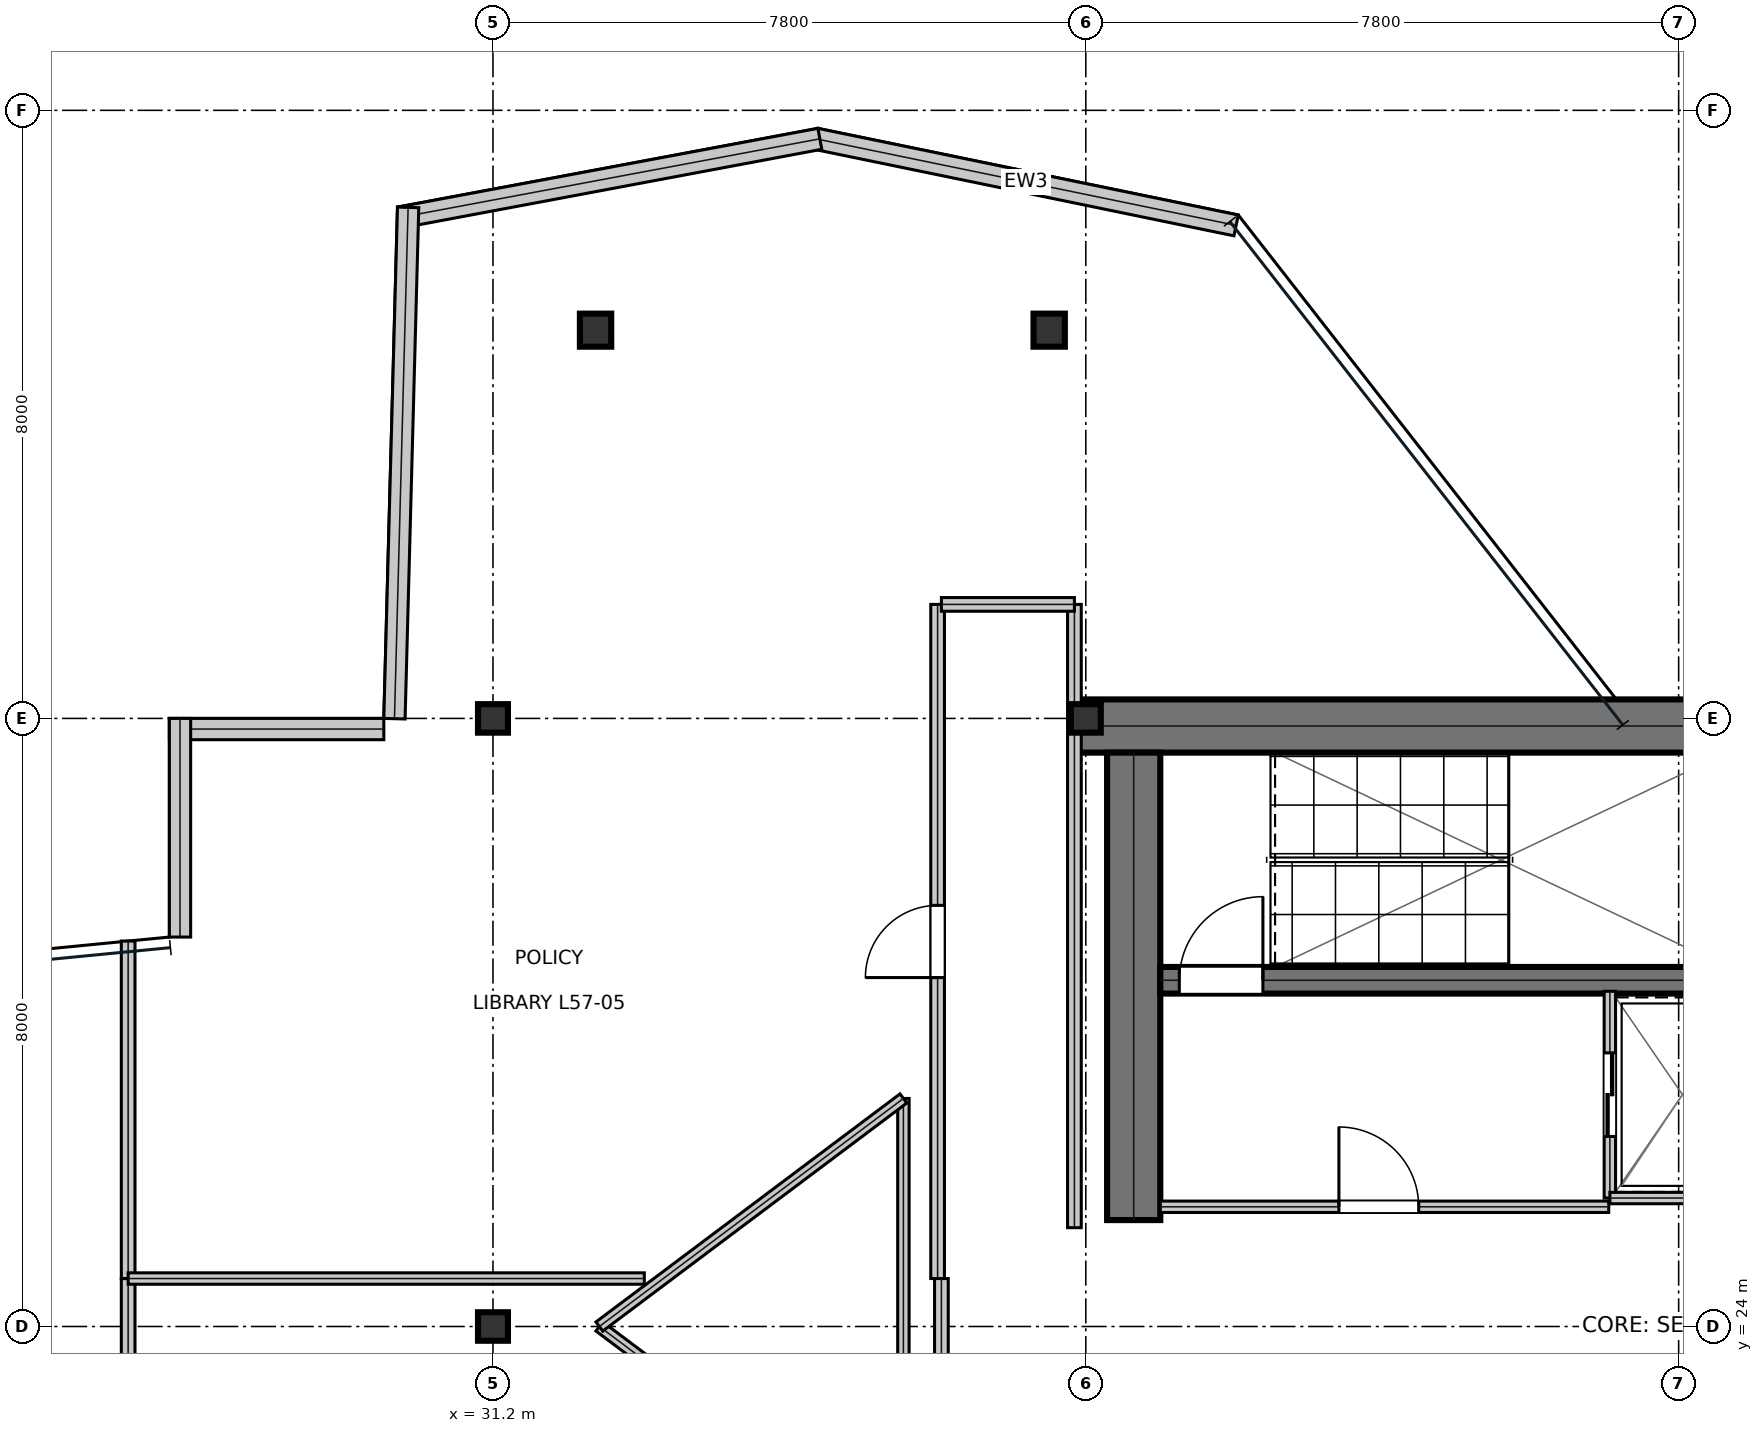
"""IFC4 building model, lengths in metres.
Left out: names, types, materials, properties, quantities, classifications, styles, units other than length and angle.
Written with IfcOpenShell. Run it as: python <this file> out.ifc"""

import sys

from ifc_helpers import new_model, si_unit, direction, frame, frame_2d, origin, origin_2d, place, context, subcontext, project, spatial, rectangle, i_section, extrude, element, fill, save


model = new_model("IFC4")
c1 = context("Model", 3, precision=1e-05, world=origin(), true_north=direction((0.0, 1.0)))
c2 = subcontext(c1, "Body", "Model", "MODEL_VIEW")
j1 = project(units=[si_unit("LENGTHUNIT", "METRE"), si_unit("PLANEANGLEUNIT", "RADIAN")], contexts=[c1])
p1 = place(None, origin())
s1 = spatial("IfcSite", under=j1, at=p1, CompositionType="ELEMENT")
p2 = place(p1, origin())
s2 = spatial("IfcBuilding", under=s1, at=p2, CompositionType="ELEMENT")
p3 = place(p2, frame((0.0, 0.0, 244.5)))
s3 = spatial("IfcBuildingStorey", under=s2, at=p3, CompositionType="ELEMENT", Elevation=244.5)
p4 = place(p3, frame((38.8, 31.9, 0.0), z_axis=(0.0, 0.0, 1.0), x_axis=(1.0, 0.0, 0.0)))
e1 = element("IfcWall", 1, at=p4, inside=s3, PredefinedType="SHEAR", context=c2, shape_type="SweptSolid", body=[
    extrude(rectangle(XDim=16.0, YDim=0.7, at=frame_2d((8.0, 0.0))), origin(), (0.0, 0.0, 1.0), 3.79),
])
p5 = place(p3, frame((39.63, 25.4, 0.0), z_axis=(0.0, 0.0, 1.0), x_axis=(0.0, 1.0, 0.0)))
e2 = element("IfcWall", 2, at=p5, inside=s3, PredefinedType="SHEAR", context=c2, shape_type="SweptSolid", body=[
    extrude(rectangle(XDim=6.15, YDim=0.7, at=frame_2d((3.075, 0.0))), origin(), (0.0, 0.0, 1.0), 3.79),
])
p6 = place(p3, frame((39.98, 28.555, 0.0), z_axis=(0.0, 0.0, 1.0), x_axis=(1.0, 0.0, 0.0)))
e3 = element("IfcWall", 3, at=p6, inside=s3, PredefinedType="SHEAR", context=c2, shape_type="SweptSolid", body=[
    extrude(rectangle(XDim=7.71, YDim=0.35, at=frame_2d((3.855, 0.0))), origin(), (0.0, 0.0, 1.0), 3.79),
])
p7 = place(p6, frame((0.25, 0.0, 0.0)))
e4 = element("IfcOpeningElement", 4, at=p7, cuts=e3, PredefinedType="OPENING", context=c2, shape_type="SweptSolid", body=[
    extrude(rectangle(XDim=1.1, YDim=2.15, at=frame_2d((0.55, 1.075))), frame((0.0, 0.185, 0.0), z_axis=(0.0, -1.0, 0.0), x_axis=(1.0, 0.0, 0.0)), (0.0, 0.0, 1.0), 0.37),
])
for number, where, z_axis, x_axis in (
    (5, (31.2, 24.0, 0.0), (0.0, 0.0, 1.0), (1.0, 0.0, 0.0)),
    (6, (31.2, 32.0, 0.0), (0.0, 0.0, 1.0), (1.0, 0.0, 0.0)),
    (7, (39.0, 32.0, 0.0), (0.0, 0.0, 1.0), (1.0, 0.0, 0.0)),
):
    element("IfcColumn", number, at=place(p3, frame(where, z_axis=z_axis, x_axis=x_axis)), inside=s3, PredefinedType="COLUMN", context=c2, shape_type="SweptSolid", body=[
        extrude(i_section(OverallWidth=0.394, OverallDepth=0.375, WebThickness=0.017, FlangeThickness=0.028, at=origin_2d()), origin(), (0.0, 0.0, 1.0), 4.044),
    ])
for number, where, z_axis, x_axis in (
    (8, (32.55, 37.108, 0.016), (0.0, 0.0, 1.0), (1.0, 0.0, 0.0)),
    (9, (38.518, 37.108, 0.016), (0.0, 0.0, 1.0), (1.0, 0.0, 0.0)),
):
    element("IfcColumn", number, at=place(p3, frame(where, z_axis=z_axis, x_axis=x_axis)), inside=s3, PredefinedType="COLUMN", context=c2, shape_type="SweptSolid", body=[
        extrude(i_section(OverallWidth=0.412, OverallDepth=0.435, WebThickness=0.036, FlangeThickness=0.058, at=origin_2d()), origin(), (0.0, 0.0, 1.0), 4.018),
    ])
p8 = place(p3, frame((40.978, 38.486, 0.0), z_axis=(0.0, 0.0, 1.0), x_axis=(-0.979426896637, 0.201799291733, 0.0)))
e10 = element("IfcWall", 10, at=p8, inside=s3, PredefinedType="STANDARD", context=c2, shape_type="SweptSolid", body=[
    extrude(rectangle(XDim=5.647, YDim=0.28, at=frame_2d((2.824, 0.0))), origin(), (0.0, 0.0, 1.0), 3.79),
])
p9 = place(p3, frame((35.5, 39.625, 0.0), z_axis=(0.0, 0.0, 1.0), x_axis=(-0.982902134609, -0.184128742409, 0.0)))
e11 = element("IfcWall", 11, at=p9, inside=s3, PredefinedType="STANDARD", context=c2, shape_type="SweptSolid", body=[
    extrude(rectangle(XDim=5.627, YDim=0.28, at=frame_2d((2.813, 0.0))), origin(), (0.0, 0.0, 1.0), 3.79),
])
p10 = place(p3, frame((30.083, 38.723, 0.0), z_axis=(0.0, 0.0, 1.0), x_axis=(-0.026702629768, -0.999643421208, 0.0)))
e12 = element("IfcWall", 12, at=p10, inside=s3, PredefinedType="STANDARD", context=c2, shape_type="SweptSolid", body=[
    extrude(rectangle(XDim=6.729, YDim=0.28, at=frame_2d((3.365, 0.0))), origin(), (0.0, 0.0, 1.0), 3.79),
])
p11 = place(p3, frame((29.764, 31.86, 0.0), z_axis=(0.0, 0.0, 1.0), x_axis=(-1.0, 0.0, 0.0)))
e13 = element("IfcWall", 13, at=p11, inside=s3, PredefinedType="STANDARD", context=c2, shape_type="SweptSolid", body=[
    extrude(rectangle(XDim=2.822, YDim=0.28, at=frame_2d((1.411, 0.0))), origin(), (0.0, 0.0, 1.0), 3.79),
])
p12 = place(p3, frame((27.083, 32.0, 0.0), z_axis=(0.0, 0.0, 1.0), x_axis=(0.0, -1.0, 0.0)))
e14 = element("IfcWall", 14, at=p12, inside=s3, PredefinedType="STANDARD", context=c2, shape_type="SweptSolid", body=[
    extrude(rectangle(XDim=2.876, YDim=0.28, at=frame_2d((1.438, 0.0))), origin(), (0.0, 0.0, 1.0), 3.319),
])
p13 = place(p3, frame((39.98, 25.575, 0.0), z_axis=(0.0, 0.0, 1.0), x_axis=(1.0, 0.0, 0.0)))
e15 = element("IfcWall", 15, at=p13, inside=s3, PredefinedType="PARTITIONING", context=c2, shape_type="SweptSolid", body=[
    extrude(rectangle(XDim=5.9, YDim=0.15, at=frame_2d((2.95, 0.0))), origin(), (0.0, 0.0, 1.0), 3.79),
])
p14 = place(p13, frame((2.35, 0.0, 0.0)))
e16 = element("IfcOpeningElement", 16, at=p14, cuts=e15, PredefinedType="OPENING", context=c2, shape_type="SweptSolid", body=[
    extrude(rectangle(XDim=1.05, YDim=2.15, at=frame_2d((0.525, 1.075))), frame((0.0, 0.085, 0.0), z_axis=(0.0, -1.0, 0.0), x_axis=(1.0, 0.0, 0.0)), (0.0, 0.0, 1.0), 0.17),
])
p15 = place(p3, frame((45.895, 25.69, 0.0), z_axis=(0.0, 0.0, 1.0), x_axis=(0.0, 1.0, 0.0)))
e17 = element("IfcWall", 17, at=p15, inside=s3, PredefinedType="PARTITIONING", context=c2, shape_type="SweptSolid", body=[
    extrude(rectangle(XDim=2.72, YDim=0.15, at=frame_2d((1.36, 0.0))), origin(), (0.0, 0.0, 1.0), 3.79),
])
p16 = place(p15, frame((0.81, 0.0, 0.0)))
e18 = element("IfcOpeningElement", 18, at=p16, cuts=e17, PredefinedType="OPENING", context=c2, shape_type="SweptSolid", body=[
    extrude(rectangle(XDim=1.1, YDim=2.15, at=frame_2d((0.55, 1.075))), frame((0.0, 0.085, 0.0), z_axis=(0.0, -1.0, 0.0), x_axis=(1.0, 0.0, 0.0)), (0.0, 0.0, 1.0), 0.17),
])
p17 = place(p3, frame((45.895, 25.69, 0.0), z_axis=(0.0, 0.0, 1.0), x_axis=(1.0, 0.0, 0.0)))
e19 = element("IfcWall", 19, at=p17, inside=s3, PredefinedType="PARTITIONING", context=c2, shape_type="SweptSolid", body=[
    extrude(rectangle(XDim=1.915, YDim=0.15, at=frame_2d((0.958, 0.0))), origin(), (0.0, 0.0, 1.0), 3.79),
])
p18 = place(p3, frame((37.05, 24.631, 0.0), z_axis=(0.0, 0.0, 1.0), x_axis=(0.0, 1.0, 0.0)))
e20 = element("IfcWall", 20, at=p18, inside=s3, PredefinedType="SOLIDWALL", context=c2, shape_type="SweptSolid", body=[
    extrude(rectangle(XDim=8.869, YDim=0.18, at=frame_2d((4.435, 0.0))), origin(), (0.0, 0.0, 1.0), 3.241),
])
p19 = place(p18, frame((3.959, 0.0, 0.0)))
e21 = element("IfcOpeningElement", 21, at=p19, cuts=e20, PredefinedType="OPENING", context=c2, shape_type="SweptSolid", body=[
    extrude(rectangle(XDim=0.95, YDim=2.15, at=frame_2d((0.475, 1.075))), frame((0.0, 0.1, 0.0), z_axis=(0.0, -1.0, 0.0), x_axis=(1.0, 0.0, 0.0)), (0.0, 0.0, 1.0), 0.2),
])
p20 = place(p3, frame((26.4, 20.6, 0.0), z_axis=(0.0, 0.0, 1.0), x_axis=(0.0, 1.0, 0.0)))
e22 = element("IfcWall", 22, at=p20, inside=s3, PredefinedType="SOLIDWALL", context=c2, shape_type="SweptSolid", body=[
    extrude(rectangle(XDim=4.031, YDim=0.18, at=frame_2d((2.016, 0.0))), origin(), (0.0, 0.0, 1.0), 3.241),
])
p21 = place(p3, frame((37.1, 20.6, 0.0), z_axis=(0.0, 0.0, 1.0), x_axis=(0.0, 1.0, 0.0)))
e23 = element("IfcWall", 23, at=p21, inside=s3, PredefinedType="SOLIDWALL", context=c2, shape_type="SweptSolid", body=[
    extrude(rectangle(XDim=4.031, YDim=0.18, at=frame_2d((2.016, 0.0))), origin(), (0.0, 0.0, 1.0), 3.79),
])
p22 = place(p3, frame((38.85, 25.3, 0.0), z_axis=(0.0, 0.0, 1.0), x_axis=(0.0, 1.0, 0.0)))
e24 = element("IfcWall", 24, at=p22, inside=s3, PredefinedType="SOLIDWALL", context=c2, shape_type="SweptSolid", body=[
    extrude(rectangle(XDim=8.2, YDim=0.18, at=frame_2d((4.1, 0.0))), origin(), (0.0, 0.0, 1.0), 3.241),
])
p23 = place(p3, frame((26.4, 24.631, 0.0), z_axis=(0.0, 0.0, 1.0), x_axis=(0.0, 1.0, 0.0)))
e25 = element("IfcWall", 25, at=p23, inside=s3, PredefinedType="SOLIDWALL", context=c2, shape_type="SweptSolid", body=[
    extrude(rectangle(XDim=4.44, YDim=0.18, at=frame_2d((2.22, 0.0))), origin(), (0.0, 0.0, 1.0), 3.241),
])
p24 = place(p3, frame((37.1, 33.5, 0.0), z_axis=(0.0, 0.0, 1.0), x_axis=(1.0, 0.0, 0.0)))
e26 = element("IfcWall", 26, at=p24, inside=s3, PredefinedType="SOLIDWALL", context=c2, shape_type="SweptSolid", body=[
    extrude(rectangle(XDim=1.75, YDim=0.18, at=frame_2d((0.875, 0.0))), origin(), (0.0, 0.0, 1.0), 3.241),
])
p25 = place(p3, frame((26.4, 24.631, 0.0), z_axis=(0.0, 0.0, 1.0), x_axis=(1.0, 0.0, 0.0)))
e27 = element("IfcWall", 27, at=p25, inside=s3, PredefinedType="MOVABLE", context=c2, shape_type="SweptSolid", body=[
    extrude(rectangle(XDim=6.792, YDim=0.15, at=frame_2d((3.396, 0.0))), origin(), (0.0, 0.0, 1.0), 3.241),
])
p26 = place(p3, frame((32.6, 24.0, 0.0), z_axis=(0.0, 0.0, 1.0), x_axis=(0.8, -0.6, 0.0)))
e28 = element("IfcWall", 28, at=p26, inside=s3, PredefinedType="MOVABLE", context=c2, shape_type="SweptSolid", body=[
    extrude(rectangle(XDim=5.0, YDim=0.15, at=frame_2d((2.5, 0.0))), origin(), (0.0, 0.0, 1.0), 3.79),
])
p27 = place(p3, frame((36.6, 21.0, 0.0), z_axis=(0.0, 0.0, 1.0), x_axis=(0.0, 1.0, 0.0)))
e29 = element("IfcWall", 29, at=p27, inside=s3, PredefinedType="MOVABLE", context=c2, shape_type="SweptSolid", body=[
    extrude(rectangle(XDim=6.0, YDim=0.15, at=frame_2d((3.0, 0.0))), origin(), (0.0, 0.0, 1.0), 3.79),
])
p28 = place(p3, frame((36.6, 27.0, 0.0), z_axis=(0.0, 0.0, 1.0), x_axis=(-0.8, -0.6, 0.0)))
e30 = element("IfcWall", 30, at=p28, inside=s3, PredefinedType="MOVABLE", context=c2, shape_type="SweptSolid", body=[
    extrude(rectangle(XDim=5.0, YDim=0.15, at=frame_2d((2.5, 0.0))), origin(), (0.0, 0.0, 1.0), 3.79),
])
p29 = place(p14, origin())
e31 = element("IfcDoor", 31, at=p29, inside=s3, OperationType="SINGLE_SWING_LEFT", PredefinedType="DOOR", context=c2, shape_type="SweptSolid", body=[
    extrude(rectangle(XDim=1.05, YDim=2.15, at=frame_2d((0.525, 1.075))), frame((0.0, 0.025, 0.0), z_axis=(0.0, -1.0, 0.0), x_axis=(1.0, 0.0, 0.0)), (0.0, 0.0, 1.0), 0.05),
])
fill(e16, e31)
p30 = place(p16, frame((1.1, 0.0, 0.0), z_axis=(0.0, 0.0, 1.0), x_axis=(-1.0, 0.0, 0.0)))
e32 = element("IfcDoor", 32, at=p30, inside=s3, OperationType="DOUBLE_DOOR_SLIDING", PredefinedType="DOOR", context=c2, shape_type="SweptSolid", body=[
    extrude(rectangle(XDim=1.1, YDim=2.15, at=frame_2d((0.55, 1.075))), frame((0.0, 0.025, 0.0), z_axis=(0.0, -1.0, 0.0), x_axis=(1.0, 0.0, 0.0)), (0.0, 0.0, 1.0), 0.05),
])
fill(e18, e32)
p31 = place(p19, origin())
e33 = element("IfcDoor", 33, at=p31, inside=s3, OperationType="SINGLE_SWING_LEFT", PredefinedType="DOOR", context=c2, shape_type="SweptSolid", body=[
    extrude(rectangle(XDim=0.95, YDim=2.15, at=frame_2d((0.475, 1.075))), frame((0.0, 0.025, 0.0), z_axis=(0.0, -1.0, 0.0), x_axis=(1.0, 0.0, 0.0)), (0.0, 0.0, 1.0), 0.05),
])
fill(e21, e33)
p32 = place(p7, origin())
e34 = element("IfcDoor", 34, at=p32, inside=s3, OperationType="SINGLE_SWING_RIGHT", PredefinedType="DOOR", context=c2, shape_type="SweptSolid", body=[
    extrude(rectangle(XDim=1.1, YDim=2.15, at=frame_2d((0.55, 1.075))), frame((0.0, 0.025, 0.0), z_axis=(0.0, -1.0, 0.0), x_axis=(1.0, 0.0, 0.0)), (0.0, 0.0, 1.0), 0.05),
])
fill(e4, e34)
save(model, sys.argv[1])
